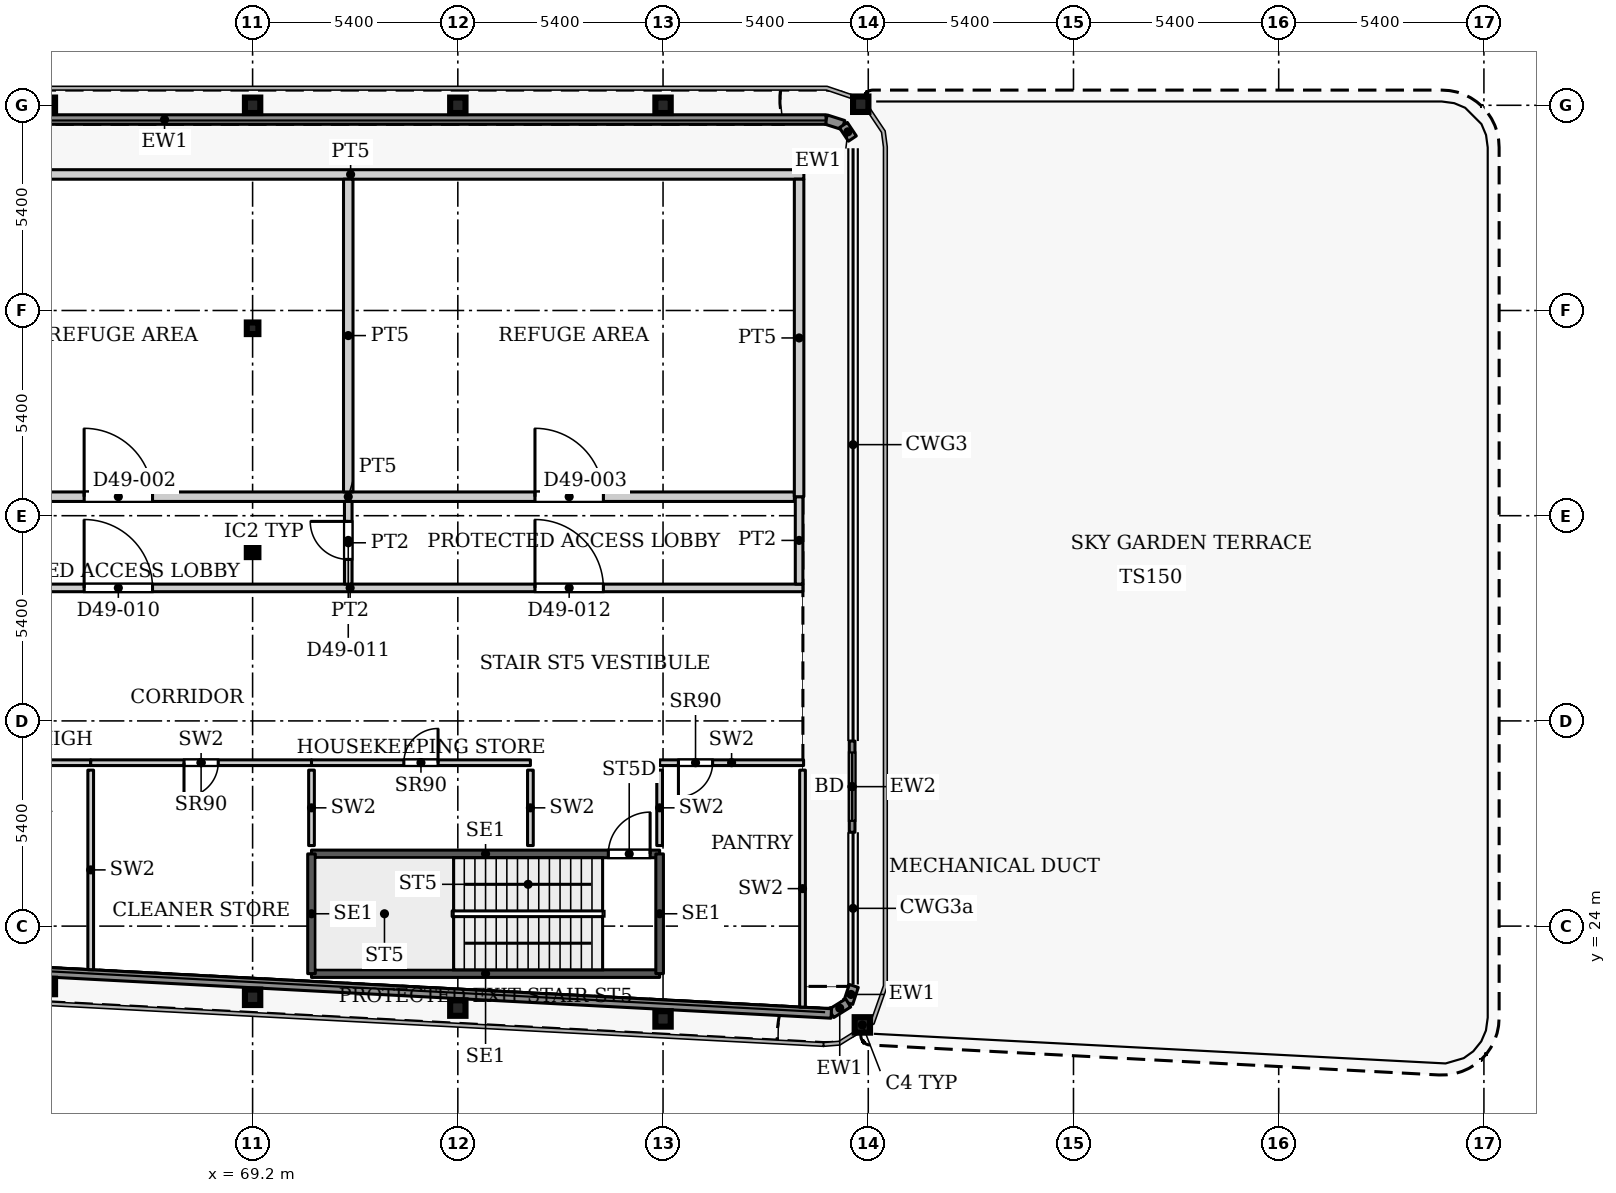
"""IFC4 building model, lengths in metres.
Left out: names, types, materials, properties, quantities, classifications, styles, units other than length and angle.
Written with IfcOpenShell. Run it as: python <this file> out.ifc"""

import sys

from ifc_helpers import new_model, si_unit, direction, frame, frame_2d, origin, origin_2d, place, context, subcontext, project, spatial, rectangle, hollow_rectangle, i_section, extrude, source, transform, mapped, element, fill, save


model = new_model("IFC4")
c1 = context("Model", 3, precision=1e-05, world=origin(), true_north=direction((0.0, 1.0)))
c2 = subcontext(c1, "Body", "Model", "MODEL_VIEW")
j1 = project(units=[si_unit("LENGTHUNIT", "METRE"), si_unit("PLANEANGLEUNIT", "RADIAN")], contexts=[c1])
p1 = place(None, origin())
s1 = spatial("IfcSite", under=j1, at=p1, CompositionType="ELEMENT")
p2 = place(p1, origin())
s2 = spatial("IfcBuilding", under=s1, at=p2, CompositionType="ELEMENT")
p3 = place(p2, frame((0.0, 0.0, 211.1)))
s3 = spatial("IfcBuildingStorey", under=s2, at=p3, CompositionType="ELEMENT", Elevation=211.1)
for number, where, z_axis, x_axis in (
    (1, (85.244, 21.4, 0.0), (0.0, 0.0, 1.0), (1.0, 0.0, 0.0)),
    (2, (80.0, 21.558, 0.0), (0.0, 0.0, 1.0), (1.0, 0.0, 0.0)),
    (3, (74.6, 21.843, 0.0), (0.0, 0.0, 1.0), (1.0, 0.0, 0.0)),
    (4, (69.2, 22.127, 0.0), (0.0, 0.0, 1.0), (1.0, 0.0, 0.0)),
    (5, (63.8, 22.411, 0.0), (0.0, 0.0, 1.0), (1.0, 0.0, 0.0)),
    (6, (63.8, 45.6, 0.0), (0.0, 0.0, 1.0), (1.0, 0.0, 0.0)),
    (7, (69.2, 45.6, 0.0), (0.0, 0.0, 1.0), (1.0, 0.0, 0.0)),
    (8, (74.6, 45.6, 0.0), (0.0, 0.0, 1.0), (1.0, 0.0, 0.0)),
    (9, (80.0, 45.6, 0.0), (0.0, 0.0, 1.0), (1.0, 0.0, 0.0)),
    (10, (85.202, 45.628, 0.0), (0.0, 0.0, 1.0), (1.0, 0.0, 0.0)),
):
    element("IfcColumn", number, at=place(p3, frame(where, z_axis=z_axis, x_axis=x_axis)), inside=s3, PredefinedType="COLUMN", context=c2, shape_type="SweptSolid", body=[
        extrude(i_section(OverallWidth=0.404, OverallDepth=0.407, WebThickness=0.027, FlangeThickness=0.044, FilletRadius=0.012, at=origin_2d()), origin(), (0.0, 0.0, 1.0), 5.1),
    ])
for number, where, z_axis, x_axis in (
    (11, (69.2, 33.863, 0.0), (0.0, 0.0, 1.0), (1.0, 0.0, 0.0)),
    (12, (69.2, 39.732, 0.0), (0.0, 0.0, 1.0), (1.0, 0.0, 0.0)),
):
    element("IfcColumn", number, at=place(p3, frame(where, z_axis=z_axis, x_axis=x_axis)), inside=s3, PredefinedType="COLUMN", context=c2, shape_type="SweptSolid", body=[
        extrude(hollow_rectangle(XDim=0.305, YDim=0.305, WallThickness=0.016, InnerFilletRadius=0.016, OuterFilletRadius=0.032, at=origin_2d()), origin(), (0.0, 0.0, 1.0), 5.1),
    ])
p4 = place(p3, frame((84.289, 45.225, 0.0), z_axis=(0.0, 0.0, 1.0), x_axis=(0.952979365451, -0.303035194367, 0.0)))
e13 = element("IfcWall", 13, at=p4, inside=s3, PredefinedType="SOLIDWALL", context=c2, shape_type="SweptSolid", body=[
    extrude(rectangle(XDim=0.479, YDim=0.25, at=frame_2d((0.239, 0.0))), origin(), (0.0, 0.0, 1.0), 4.95),
])
p5 = place(p3, frame((84.745, 45.08, 0.0), z_axis=(0.0, 0.0, 1.0), x_axis=(0.553909274329, -0.83257703296, 0.0)))
e14 = element("IfcWall", 14, at=p5, inside=s3, PredefinedType="SOLIDWALL", context=c2, shape_type="SweptSolid", body=[
    extrude(rectangle(XDim=0.427, YDim=0.25, at=frame_2d((0.214, 0.0))), origin(), (0.0, 0.0, 1.0), 4.95),
])
p6 = place(p3, frame((84.975, 28.87, 0.0), z_axis=(0.0, 0.0, 1.0), x_axis=(0.0, -1.0, 0.0)))
e15 = element("IfcWall", 15, at=p6, inside=s3, PredefinedType="SOLIDWALL", context=c2, shape_type="SweptSolid", body=[
    extrude(rectangle(XDim=2.4, YDim=0.15, at=frame_2d((1.2, 0.0))), origin(), (0.0, 0.0, 1.0), 4.95),
])
p7 = place(p6, frame((0.3, 0.0, 0.0)))
e16 = element("IfcOpeningElement", 16, at=p7, cuts=e15, PredefinedType="OPENING", context=c2, shape_type="SweptSolid", body=[
    extrude(rectangle(XDim=1.8, YDim=2.4, at=frame_2d((0.9, 1.2))), frame((0.0, 0.085, 0.0), z_axis=(0.0, -1.0, 0.0), x_axis=(1.0, 0.0, 0.0)), (0.0, 0.0, 1.0), 0.17),
])
p8 = place(p3, frame((85.019, 22.426, 0.0), z_axis=(0.0, 0.0, 1.0), x_axis=(-0.311719287372, -0.950174239748, 0.0)))
e17 = element("IfcWall", 17, at=p8, inside=s3, PredefinedType="SOLIDWALL", context=c2, shape_type="SweptSolid", body=[
    extrude(rectangle(XDim=0.471, YDim=0.25, at=frame_2d((0.236, 0.0))), origin(), (0.0, 0.0, 1.0), 4.95),
])
p9 = place(p3, frame((84.872, 21.978, 0.0), z_axis=(0.0, 0.0, 1.0), x_axis=(-0.848912677732, -0.52853312629, 0.0)))
e18 = element("IfcWall", 18, at=p9, inside=s3, PredefinedType="SOLIDWALL", context=c2, shape_type="SweptSolid", body=[
    extrude(rectangle(XDim=0.524, YDim=0.25, at=frame_2d((0.262, 0.0))), origin(), (0.0, 0.0, 1.0), 4.95),
])
p10 = place(p3, frame((84.427, 21.701, 0.0), z_axis=(0.0, 0.0, 1.0), x_axis=(-0.998617722402, 0.052560864767, 0.0)))
e19 = element("IfcWall", 19, at=p10, inside=s3, PredefinedType="SOLIDWALL", context=c2, shape_type="SweptSolid", body=[
    extrude(rectangle(XDim=50.458, YDim=0.25, at=frame_2d((25.229, 0.0))), origin(), (0.0, 0.0, 1.0), 4.95),
])
p11 = place(p3, frame((49.477, 45.225, 0.0), z_axis=(0.0, 0.0, 1.0), x_axis=(1.0, 0.0, 0.0)))
e20 = element("IfcWall", 20, at=p11, inside=s3, PredefinedType="SOLIDWALL", context=c2, shape_type="SweptSolid", body=[
    extrude(rectangle(XDim=34.812, YDim=0.25, at=frame_2d((17.406, 0.0))), origin(), (0.0, 0.0, 1.0), 4.95),
])
p12 = place(p3, frame((70.75, 22.75, 0.0), z_axis=(0.0, 0.0, 1.0), x_axis=(1.0, 0.0, 0.0)))
e21 = element("IfcWall", 21, at=p12, inside=s3, PredefinedType="SHEAR", context=c2, shape_type="SweptSolid", body=[
    extrude(rectangle(XDim=9.16, YDim=0.2, at=frame_2d((4.58, 0.0))), origin(), (0.0, 0.0, 1.0), 5.1),
])
p13 = place(p3, frame((70.75, 25.9, 0.0), z_axis=(0.0, 0.0, 1.0), x_axis=(1.0, 0.0, 0.0)))
e22 = element("IfcWall", 22, at=p13, inside=s3, PredefinedType="SHEAR", context=c2, shape_type="SweptSolid", body=[
    extrude(rectangle(XDim=9.16, YDim=0.2, at=frame_2d((4.58, 0.0))), origin(), (0.0, 0.0, 1.0), 5.1),
])
p14 = place(p13, frame((7.81, 0.0, 0.0)))
e23 = element("IfcOpeningElement", 23, at=p14, cuts=e22, PredefinedType="OPENING", context=c2, shape_type="SweptSolid", body=[
    extrude(rectangle(XDim=1.1, YDim=2.2, at=frame_2d((0.55, 1.1))), frame((0.0, 0.11, 0.0), z_axis=(0.0, -1.0, 0.0), x_axis=(1.0, 0.0, 0.0)), (0.0, 0.0, 1.0), 0.22),
])
for number, where, z_axis, x_axis in (
    (24, (70.75, 22.75, 0.0), (0.0, 0.0, 1.0), (0.0, 1.0, 0.0)),
    (25, (79.91, 22.75, 0.0), (0.0, 0.0, 1.0), (0.0, 1.0, 0.0)),
):
    element("IfcWall", number, at=place(p3, frame(where, z_axis=z_axis, x_axis=x_axis)), inside=s3, PredefinedType="SHEAR", context=c2, shape_type="SweptSolid", body=[
        extrude(rectangle(XDim=3.15, YDim=0.2, at=frame_2d((1.575, 0.0))), origin(), (0.0, 0.0, 1.0), 5.1),
    ])
p15 = place(p3, frame((60.75, 28.3, 0.0), z_axis=(0.0, 0.0, 1.0), x_axis=(1.0, 0.0, 0.0)))
e26 = element("IfcWall", 26, at=p15, inside=s3, PredefinedType="PARTITIONING", context=c2, shape_type="SweptSolid", body=[
    extrude(rectangle(XDim=4.19, YDim=0.15, at=frame_2d((2.095, 0.0))), origin(), (0.0, 0.0, 1.0), 4.272),
])
p16 = place(p3, frame((64.94, 22.854, 0.0), z_axis=(0.0, 0.0, 1.0), x_axis=(0.0, 1.0, 0.0)))
e27 = element("IfcWall", 27, at=p16, inside=s3, PredefinedType="PARTITIONING", context=c2, shape_type="SweptSolid", body=[
    extrude(rectangle(XDim=5.251, YDim=0.15, at=frame_2d((2.625, 0.0))), origin(), (0.0, 0.0, 1.0), 5.1),
])
p17 = place(p3, frame((64.94, 28.3, 0.0), z_axis=(0.0, 0.0, 1.0), x_axis=(1.0, 0.0, 0.0)))
e28 = element("IfcWall", 28, at=p17, inside=s3, PredefinedType="PARTITIONING", context=c2, shape_type="SweptSolid", body=[
    extrude(rectangle(XDim=5.81, YDim=0.15, at=frame_2d((2.905, 0.0))), origin(), (0.0, 0.0, 1.0), 5.1),
])
p18 = place(p17, frame((2.455, 0.0, 0.0)))
e29 = element("IfcOpeningElement", 29, at=p18, cuts=e28, PredefinedType="OPENING", context=c2, shape_type="SweptSolid", body=[
    extrude(rectangle(XDim=0.9, YDim=2.2, at=frame_2d((0.45, 1.1))), frame((0.0, 0.085, 0.0), z_axis=(0.0, -1.0, 0.0), x_axis=(1.0, 0.0, 0.0)), (0.0, 0.0, 1.0), 0.17),
])
p19 = place(p3, frame((70.75, 26.12, 0.0), z_axis=(0.0, 0.0, 1.0), x_axis=(0.0, 1.0, 0.0)))
e30 = element("IfcWall", 30, at=p19, inside=s3, PredefinedType="PARTITIONING", context=c2, shape_type="SweptSolid", body=[
    extrude(rectangle(XDim=1.985, YDim=0.15, at=frame_2d((0.992, 0.0))), origin(), (0.0, 0.0, 1.0), 5.1),
])
p20 = place(p3, frame((70.75, 28.3, 0.0), z_axis=(0.0, 0.0, 1.0), x_axis=(1.0, 0.0, 0.0)))
e31 = element("IfcWall", 31, at=p20, inside=s3, PredefinedType="PARTITIONING", context=c2, shape_type="SweptSolid", body=[
    extrude(rectangle(XDim=5.76, YDim=0.15, at=frame_2d((2.88, 0.0))), origin(), (0.0, 0.0, 1.0), 5.1),
])
p21 = place(p20, frame((2.43, 0.0, 0.0)))
e32 = element("IfcOpeningElement", 32, at=p21, cuts=e31, PredefinedType="OPENING", context=c2, shape_type="SweptSolid", body=[
    extrude(rectangle(XDim=0.9, YDim=2.2, at=frame_2d((0.45, 1.1))), frame((0.0, 0.085, 0.0), z_axis=(0.0, -1.0, 0.0), x_axis=(1.0, 0.0, 0.0)), (0.0, 0.0, 1.0), 0.17),
])
p22 = place(p3, frame((76.51, 26.12, 0.0), z_axis=(0.0, 0.0, 1.0), x_axis=(0.0, 1.0, 0.0)))
e33 = element("IfcWall", 33, at=p22, inside=s3, PredefinedType="PARTITIONING", context=c2, shape_type="SweptSolid", body=[
    extrude(rectangle(XDim=1.985, YDim=0.15, at=frame_2d((0.992, 0.0))), origin(), (0.0, 0.0, 1.0), 5.1),
])
p23 = place(p3, frame((79.91, 28.3, 0.0), z_axis=(0.0, 0.0, 1.0), x_axis=(1.0, 0.0, 0.0)))
e34 = element("IfcWall", 34, at=p23, inside=s3, PredefinedType="PARTITIONING", context=c2, shape_type="SweptSolid", body=[
    extrude(rectangle(XDim=3.788, YDim=0.15, at=frame_2d((1.894, 0.0))), origin(), (0.0, 0.0, 1.0), 5.1),
])
p24 = place(p23, frame((0.495, 0.0, 0.0)))
e35 = element("IfcOpeningElement", 35, at=p24, cuts=e34, PredefinedType="OPENING", context=c2, shape_type="SweptSolid", body=[
    extrude(rectangle(XDim=0.9, YDim=2.2, at=frame_2d((0.45, 1.1))), frame((0.0, 0.085, 0.0), z_axis=(0.0, -1.0, 0.0), x_axis=(1.0, 0.0, 0.0)), (0.0, 0.0, 1.0), 0.17),
])
p25 = place(p3, frame((79.91, 26.12, 0.0), z_axis=(0.0, 0.0, 1.0), x_axis=(0.0, 1.0, 0.0)))
e36 = element("IfcWall", 36, at=p25, inside=s3, PredefinedType="PARTITIONING", context=c2, shape_type="SweptSolid", body=[
    extrude(rectangle(XDim=1.985, YDim=0.15, at=frame_2d((0.992, 0.0))), origin(), (0.0, 0.0, 1.0), 5.1),
])
p26 = place(p3, frame((83.67, 21.868, 0.0), z_axis=(0.0, 0.0, 1.0), x_axis=(0.0, 1.0, 0.0)))
e37 = element("IfcWall", 37, at=p26, inside=s3, PredefinedType="PARTITIONING", context=c2, shape_type="SweptSolid", body=[
    extrude(rectangle(XDim=6.237, YDim=0.15, at=frame_2d((3.119, 0.0))), origin(), (0.0, 0.0, 1.0), 5.1),
])
p27 = place(p3, frame((59.853, 32.9, 0.0), z_axis=(0.0, 0.0, 1.0), x_axis=(1.0, 0.0, 0.0)))
e38 = element("IfcWall", 38, at=p27, inside=s3, PredefinedType="PARTITIONING", context=c2, shape_type="SweptSolid", body=[
    extrude(rectangle(XDim=23.827, YDim=0.2, at=frame_2d((11.914, 0.0))), origin(), (0.0, 0.0, 1.0), 4.8),
])
p28 = place(p27, frame((4.914, 0.0, 0.0)))
e39 = element("IfcOpeningElement", 39, at=p28, cuts=e38, PredefinedType="OPENING", context=c2, shape_type="SweptSolid", body=[
    extrude(rectangle(XDim=1.8, YDim=2.1, at=frame_2d((0.9, 1.05))), frame((0.0, 0.11, 0.0), z_axis=(0.0, -1.0, 0.0), x_axis=(1.0, 0.0, 0.0)), (0.0, 0.0, 1.0), 0.22),
])
p29 = place(p27, frame((16.777, 0.0, 0.0)))
e40 = element("IfcOpeningElement", 40, at=p29, cuts=e38, PredefinedType="OPENING", context=c2, shape_type="SweptSolid", body=[
    extrude(rectangle(XDim=1.8, YDim=2.1, at=frame_2d((0.9, 1.05))), frame((0.0, 0.11, 0.0), z_axis=(0.0, -1.0, 0.0), x_axis=(1.0, 0.0, 0.0)), (0.0, 0.0, 1.0), 0.22),
])
p30 = place(p3, frame((59.853, 43.78, 0.0), z_axis=(0.0, 0.0, 1.0), x_axis=(1.0, 0.0, 0.0)))
e41 = element("IfcWall", 41, at=p30, inside=s3, PredefinedType="PARTITIONING", context=c2, shape_type="SweptSolid", body=[
    extrude(rectangle(XDim=23.852, YDim=0.25, at=frame_2d((11.926, 0.0))), origin(), (0.0, 0.0, 1.0), 4.8),
])
p31 = place(p3, frame((59.978, 35.3, 0.0), z_axis=(0.0, 0.0, 1.0), x_axis=(1.0, 0.0, 0.0)))
e42 = element("IfcWall", 42, at=p31, inside=s3, PredefinedType="PARTITIONING", context=c2, shape_type="SweptSolid", body=[
    extrude(rectangle(XDim=23.477, YDim=0.25, at=frame_2d((11.739, 0.0))), origin(), (0.0, 0.0, 1.0), 4.8),
])
p32 = place(p31, frame((4.789, 0.0, 0.0)))
e43 = element("IfcOpeningElement", 43, at=p32, cuts=e42, PredefinedType="OPENING", context=c2, shape_type="SweptSolid", body=[
    extrude(rectangle(XDim=1.8, YDim=2.1, at=frame_2d((0.9, 1.05))), frame((0.0, 0.135, 0.0), z_axis=(0.0, -1.0, 0.0), x_axis=(1.0, 0.0, 0.0)), (0.0, 0.0, 1.0), 0.27),
])
p33 = place(p31, frame((16.652, 0.0, 0.0)))
e44 = element("IfcOpeningElement", 44, at=p33, cuts=e42, PredefinedType="OPENING", context=c2, shape_type="SweptSolid", body=[
    extrude(rectangle(XDim=1.8, YDim=2.1, at=frame_2d((0.9, 1.05))), frame((0.0, 0.135, 0.0), z_axis=(0.0, -1.0, 0.0), x_axis=(1.0, 0.0, 0.0)), (0.0, 0.0, 1.0), 0.27),
])
p34 = place(p3, frame((71.717, 33.0, 0.0), z_axis=(0.0, 0.0, 1.0), x_axis=(0.0, 1.0, 0.0)))
e45 = element("IfcWall", 45, at=p34, inside=s3, PredefinedType="PARTITIONING", context=c2, shape_type="SweptSolid", body=[
    extrude(rectangle(XDim=2.175, YDim=0.2, at=frame_2d((1.087, 0.0))), origin(), (0.0, 0.0, 1.0), 4.8),
])
p35 = place(p34, frame((0.65, 0.0, 0.0)))
e46 = element("IfcOpeningElement", 46, at=p35, cuts=e45, PredefinedType="OPENING", context=c2, shape_type="SweptSolid", body=[
    extrude(rectangle(XDim=1.0, YDim=2.1, at=frame_2d((0.5, 1.05))), frame((0.0, 0.11, 0.0), z_axis=(0.0, -1.0, 0.0), x_axis=(1.0, 0.0, 0.0)), (0.0, 0.0, 1.0), 0.22),
])
p36 = place(p3, frame((71.717, 35.425, 0.0), z_axis=(0.0, 0.0, 1.0), x_axis=(0.0, 1.0, 0.0)))
e47 = element("IfcWall", 47, at=p36, inside=s3, PredefinedType="PARTITIONING", context=c2, shape_type="SweptSolid", body=[
    extrude(rectangle(XDim=8.23, YDim=0.25, at=frame_2d((4.115, 0.0))), origin(), (0.0, 0.0, 1.0), 4.8),
])
p37 = place(p3, frame((83.58, 33.0, 0.0), z_axis=(0.0, 0.0, 1.0), x_axis=(0.0, 1.0, 0.0)))
e48 = element("IfcWall", 48, at=p37, inside=s3, PredefinedType="PARTITIONING", context=c2, shape_type="SweptSolid", body=[
    extrude(rectangle(XDim=2.3, YDim=0.2, at=frame_2d((1.15, 0.0))), origin(), (0.0, 0.0, 1.0), 4.8),
])
p38 = place(p3, frame((83.58, 35.3, 0.0), z_axis=(0.0, 0.0, 1.0), x_axis=(0.0, 1.0, 0.0)))
e49 = element("IfcWall", 49, at=p38, inside=s3, PredefinedType="PARTITIONING", context=c2, shape_type="SweptSolid", body=[
    extrude(rectangle(XDim=8.355, YDim=0.25, at=frame_2d((4.177, 0.0))), origin(), (0.0, 0.0, 1.0), 4.8),
])
m1 = source(origin(), c2, "Body", "SweptSolid", [
    extrude(rectangle(XDim=1.8, YDim=2.4, at=frame_2d((0.9, 1.2))), frame((0.0, 0.025, 0.0), z_axis=(0.0, -1.0, 0.0), x_axis=(1.0, 0.0, 0.0)), (0.0, 0.0, 1.0), 0.05),
])
p39 = place(p7, origin())
e50 = element("IfcDoor", 50, at=p39, inside=s3, OperationType="SLIDING_TO_LEFT", PredefinedType="DOOR", context=c2, shape_type="MappedRepresentation", body=[
    mapped(m1, transform((0.0, 0.0, 0.0), x_axis=(1.0, 0.0, 0.0), y_axis=(0.0, 1.0, 0.0), z_axis=(0.0, 0.0, 1.0), scale=1.0)),
])
fill(e16, e50)
m2 = source(origin(), c2, "Body", "SweptSolid", [
    extrude(rectangle(XDim=0.9, YDim=2.2, at=frame_2d((0.45, 1.1))), frame((0.0, 0.025, 0.0), z_axis=(0.0, -1.0, 0.0), x_axis=(1.0, 0.0, 0.0)), (0.0, 0.0, 1.0), 0.05),
])
p40 = place(p18, origin())
e51 = element("IfcDoor", 51, at=p40, inside=s3, OperationType="SINGLE_SWING_RIGHT", PredefinedType="DOOR", context=c2, shape_type="MappedRepresentation", body=[
    mapped(m2, transform((0.0, 0.0, 0.0), x_axis=(1.0, 0.0, 0.0), y_axis=(0.0, 1.0, 0.0), z_axis=(0.0, 0.0, 1.0), scale=1.0)),
])
fill(e29, e51)
p41 = place(p21, origin())
e52 = element("IfcDoor", 52, at=p41, inside=s3, OperationType="SINGLE_SWING_LEFT", PredefinedType="DOOR", context=c2, shape_type="MappedRepresentation", body=[
    mapped(m2, transform((0.0, 0.0, 0.0), x_axis=(1.0, 0.0, 0.0), y_axis=(0.0, 1.0, 0.0), z_axis=(0.0, 0.0, 1.0), scale=1.0)),
])
fill(e32, e52)
p42 = place(p24, origin())
e53 = element("IfcDoor", 53, at=p42, inside=s3, OperationType="SINGLE_SWING_RIGHT", PredefinedType="DOOR", context=c2, shape_type="MappedRepresentation", body=[
    mapped(m2, transform((0.0, 0.0, 0.0), x_axis=(1.0, 0.0, 0.0), y_axis=(0.0, 1.0, 0.0), z_axis=(0.0, 0.0, 1.0), scale=1.0)),
])
fill(e35, e53)
m3 = source(origin(), c2, "Body", "SweptSolid", [
    extrude(rectangle(XDim=1.1, YDim=2.2, at=frame_2d((0.55, 1.1))), frame((0.0, 0.025, 0.0), z_axis=(0.0, -1.0, 0.0), x_axis=(1.0, 0.0, 0.0)), (0.0, 0.0, 1.0), 0.05),
])
p43 = place(p14, origin())
e54 = element("IfcDoor", 54, at=p43, inside=s3, OperationType="SINGLE_SWING_LEFT", PredefinedType="DOOR", context=c2, shape_type="MappedRepresentation", body=[
    mapped(m3, transform((0.0, 0.0, 0.0), x_axis=(1.0, 0.0, 0.0), y_axis=(0.0, 1.0, 0.0), z_axis=(0.0, 0.0, 1.0), scale=1.0)),
])
fill(e23, e54)
m4 = source(origin(), c2, "Body", "SweptSolid", [
    extrude(rectangle(XDim=1.8, YDim=2.1, at=frame_2d((0.9, 1.05))), frame((0.0, 0.025, 0.0), z_axis=(0.0, -1.0, 0.0), x_axis=(1.0, 0.0, 0.0)), (0.0, 0.0, 1.0), 0.05),
])
p44 = place(p32, origin())
e55 = element("IfcDoor", 55, at=p44, inside=s3, OperationType="DOUBLE_DOOR_SINGLE_SWING", PredefinedType="DOOR", context=c2, shape_type="MappedRepresentation", body=[
    mapped(m4, transform((0.0, 0.0, 0.0), x_axis=(1.0, 0.0, 0.0), y_axis=(0.0, 1.0, 0.0), z_axis=(0.0, 0.0, 1.0), scale=1.0)),
])
fill(e43, e55)
p45 = place(p33, origin())
e56 = element("IfcDoor", 56, at=p45, inside=s3, OperationType="DOUBLE_DOOR_SINGLE_SWING", PredefinedType="DOOR", context=c2, shape_type="MappedRepresentation", body=[
    mapped(m4, transform((0.0, 0.0, 0.0), x_axis=(1.0, 0.0, 0.0), y_axis=(0.0, 1.0, 0.0), z_axis=(0.0, 0.0, 1.0), scale=1.0)),
])
fill(e44, e56)
m5 = source(origin(), c2, "Body", "SweptSolid", [
    extrude(rectangle(XDim=1.8, YDim=2.1, at=frame_2d((0.9, 1.05))), frame((0.0, 0.025, 0.0), z_axis=(0.0, -1.0, 0.0), x_axis=(1.0, 0.0, 0.0)), (0.0, 0.0, 1.0), 0.05),
])
p46 = place(p28, origin())
e57 = element("IfcDoor", 57, at=p46, inside=s3, OperationType="DOUBLE_DOOR_SINGLE_SWING", PredefinedType="DOOR", context=c2, shape_type="MappedRepresentation", body=[
    mapped(m5, transform((0.0, 0.0, 0.0), x_axis=(1.0, 0.0, 0.0), y_axis=(0.0, 1.0, 0.0), z_axis=(0.0, 0.0, 1.0), scale=1.0)),
])
fill(e39, e57)
m6 = source(origin(), c2, "Body", "SweptSolid", [
    extrude(rectangle(XDim=1.0, YDim=2.1, at=frame_2d((0.5, 1.05))), frame((0.0, 0.025, 0.0), z_axis=(0.0, -1.0, 0.0), x_axis=(1.0, 0.0, 0.0)), (0.0, 0.0, 1.0), 0.05),
])
p47 = place(p35, origin())
e58 = element("IfcDoor", 58, at=p47, inside=s3, OperationType="SINGLE_SWING_LEFT", PredefinedType="DOOR", context=c2, shape_type="MappedRepresentation", body=[
    mapped(m6, transform((0.0, 0.0, 0.0), x_axis=(1.0, 0.0, 0.0), y_axis=(0.0, 1.0, 0.0), z_axis=(0.0, 0.0, 1.0), scale=1.0)),
])
fill(e46, e58)
p48 = place(p29, origin())
e59 = element("IfcDoor", 59, at=p48, inside=s3, OperationType="DOUBLE_DOOR_SINGLE_SWING", PredefinedType="DOOR", context=c2, shape_type="MappedRepresentation", body=[
    mapped(m5, transform((0.0, 0.0, 0.0), x_axis=(1.0, 0.0, 0.0), y_axis=(0.0, 1.0, 0.0), z_axis=(0.0, 0.0, 1.0), scale=1.0)),
])
fill(e40, e59)
save(model, sys.argv[1])
